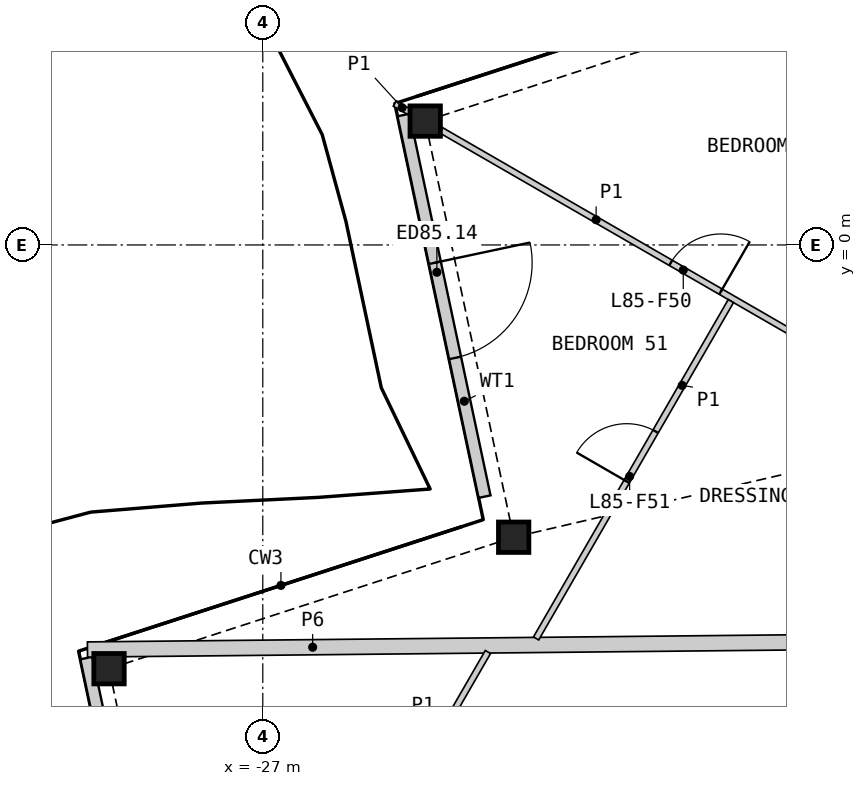
"""IFC4 building model, lengths in metres.
Left out: names, types, materials, properties, quantities, classifications, styles, units other than length and angle.
Written with IfcOpenShell. Run it as: python <this file> out.ifc"""

import sys

from ifc_helpers import new_model, si_unit, direction, frame, frame_2d, origin, origin_2d, place, context, subcontext, project, spatial, rectangle, hollow_rectangle, extrude, element, fill, save


model = new_model("IFC4")
c1 = context("Model", 3, precision=1e-05, world=origin(), true_north=direction((0.0, 1.0)))
c2 = subcontext(c1, "Body", "Model", "MODEL_VIEW")
j1 = project(units=[si_unit("LENGTHUNIT", "METRE"), si_unit("PLANEANGLEUNIT", "RADIAN")], contexts=[c1])
p1 = place(None, origin())
s1 = spatial("IfcSite", under=j1, at=p1, CompositionType="ELEMENT")
p2 = place(p1, origin())
s2 = spatial("IfcBuilding", under=s1, at=p2, CompositionType="ELEMENT")
p3 = place(p2, frame((0.0, 0.0, 378.0)))
s3 = spatial("IfcBuildingStorey", under=s2, at=p3, CompositionType="ELEMENT", Elevation=378.0)
for number, where, z_axis, x_axis in (
    (1, (-24.329, 2.037, 0.0), (0.0, 0.0, 1.0), (1.0, 0.0, 0.0)),
    (2, (-22.874, -4.807, 0.0), (0.0, 0.0, 1.0), (1.0, 0.0, 0.0)),
    (3, (-29.529, -6.969, 0.0), (0.0, 0.0, 1.0), (1.0, 0.0, 0.0)),
):
    element("IfcColumn", number, at=place(p3, frame(where, z_axis=z_axis, x_axis=x_axis)), inside=s3, PredefinedType="COLUMN", context=c2, shape_type="SweptSolid", body=[
        extrude(hollow_rectangle(XDim=0.5, YDim=0.5, WallThickness=0.03, at=origin_2d()), origin(), (0.0, 0.0, 1.0), 3.4),
    ])
p4 = place(p3, frame((-24.687, 2.137, 0.0), z_axis=(0.0, 0.0, 1.0), x_axis=(0.207904718109, -0.978149082803, 0.0)))
e4 = element("IfcWall", 4, at=p4, inside=s3, PredefinedType="SOLIDWALL", context=c2, shape_type="SweptSolid", body=[
    extrude(rectangle(XDim=6.416, YDim=0.2, at=frame_2d((3.208, 0.0))), origin(), (0.0, 0.0, 1.0), 2.634),
])
p5 = place(p4, frame((2.484, 0.0, 0.0)))
e5 = element("IfcOpeningElement", 5, at=p5, cuts=e4, PredefinedType="OPENING", context=c2, shape_type="SweptSolid", body=[
    extrude(rectangle(XDim=1.6, YDim=2.25, at=frame_2d((0.8, 1.125))), frame((0.0, 0.11, 0.0), z_axis=(0.0, -1.0, 0.0), x_axis=(1.0, 0.0, 0.0)), (0.0, 0.0, 1.0), 0.22),
])
p6 = place(p3, frame((-29.903, -6.795, 0.0), z_axis=(0.0, 0.0, 1.0), x_axis=(0.207923959653, -0.978144992832, 0.0)))
e6 = element("IfcWall", 6, at=p6, inside=s3, PredefinedType="SOLIDWALL", context=c2, shape_type="SweptSolid", body=[
    extrude(rectangle(XDim=6.493, YDim=0.2, at=frame_2d((3.247, 0.0))), origin(), (0.0, 0.0, 1.0), 2.634),
])
p7 = place(p6, frame((2.561, 0.0, 0.0)))
e7 = element("IfcOpeningElement", 7, at=p7, cuts=e6, PredefinedType="OPENING", context=c2, shape_type="SweptSolid", body=[
    extrude(rectangle(XDim=1.6, YDim=2.25, at=frame_2d((0.8, 1.125))), frame((0.0, 0.11, 0.0), z_axis=(0.0, -1.0, 0.0), x_axis=(1.0, 0.0, 0.0)), (0.0, 0.0, 1.0), 0.22),
])
p8 = place(p3, frame((-29.883, -6.654, 0.0), z_axis=(0.0, 0.0, 1.0), x_axis=(0.999949143254, 0.010085182526, 0.0)))
e8 = element("IfcWall", 8, at=p8, inside=s3, PredefinedType="PARTITIONING", context=c2, shape_type="SweptSolid", body=[
    extrude(rectangle(XDim=14.815, YDim=0.25, at=frame_2d((7.408, 0.0))), origin(), (0.0, 0.0, 1.0), 2.33),
])
p9 = place(p3, frame((-24.069, 1.887, 0.0), z_axis=(0.0, 0.0, 1.0), x_axis=(0.866023404247, -0.500003463284, 0.0)))
e9 = element("IfcWall", 9, at=p9, inside=s3, PredefinedType="PARTITIONING", context=c2, shape_type="SweptSolid", body=[
    extrude(rectangle(XDim=11.782, YDim=0.1, at=frame_2d((5.891, 0.0))), origin(), (0.0, 0.0, 1.0), 2.33),
])
p10 = place(p9, frame((4.363, 0.0, 0.0)))
e10 = element("IfcOpeningElement", 10, at=p10, cuts=e9, PredefinedType="OPENING", context=c2, shape_type="SweptSolid", body=[
    extrude(rectangle(XDim=0.95, YDim=2.1, at=frame_2d((0.475, 1.05))), frame((0.0, 0.06, 0.0), z_axis=(0.0, -1.0, 0.0), x_axis=(1.0, 0.0, 0.0)), (0.0, 0.0, 1.0), 0.12),
])
p11 = place(p3, frame((-22.505, -6.472, 0.0), z_axis=(0.0, 0.0, 1.0), x_axis=(0.499999516514, 0.866025682925, 0.0)))
e11 = element("IfcWall", 11, at=p11, inside=s3, PredefinedType="PARTITIONING", context=c2, shape_type="SweptSolid", body=[
    extrude(rectangle(XDim=6.407, YDim=0.1, at=frame_2d((3.204, 0.0))), origin(), (0.0, 0.0, 1.0), 2.33),
])
p12 = place(p11, frame((2.981, 0.0, 0.0)))
e12 = element("IfcOpeningElement", 12, at=p12, cuts=e11, PredefinedType="OPENING", context=c2, shape_type="SweptSolid", body=[
    extrude(rectangle(XDim=0.95, YDim=2.1, at=frame_2d((0.475, 1.05))), frame((0.0, 0.06, 0.0), z_axis=(0.0, -1.0, 0.0), x_axis=(1.0, 0.0, 0.0)), (0.0, 0.0, 1.0), 0.12),
])
p13 = place(p3, frame((-24.726, -9.169, 0.0), z_axis=(0.0, 0.0, 1.0), x_axis=(0.499971481985, 0.866041868042, 0.0)))
e13 = element("IfcWall", 13, at=p13, inside=s3, PredefinedType="PARTITIONING", context=c2, shape_type="SweptSolid", body=[
    extrude(rectangle(XDim=2.857, YDim=0.1, at=frame_2d((1.429, 0.0))), origin(), (0.0, 0.0, 1.0), 2.33),
])
p14 = place(p3, frame((-24.829, 2.326, 0.0), z_axis=(0.0, 0.0, 1.0), x_axis=(0.866288059981, -0.499544789918, 0.0)))
e14 = element("IfcWall", 14, at=p14, inside=s3, PredefinedType="PARTITIONING", context=c2, shape_type="SweptSolid", body=[
    extrude(rectangle(XDim=0.278, YDim=0.1, at=frame_2d((0.139, 0.0))), origin(), (0.0, 0.0, 1.0), 2.33),
])
p15 = place(p5, origin())
e15 = element("IfcDoor", 15, at=p15, inside=s3, OperationType="DOUBLE_DOOR_SINGLE_SWING", PredefinedType="DOOR", context=c2, shape_type="SweptSolid", body=[
    extrude(rectangle(XDim=1.6, YDim=2.25, at=frame_2d((0.8, 1.125))), frame((0.0, 0.025, 0.0), z_axis=(0.0, -1.0, 0.0), x_axis=(1.0, 0.0, 0.0)), (0.0, 0.0, 1.0), 0.05),
])
fill(e5, e15)
p16 = place(p10, origin())
e16 = element("IfcDoor", 16, at=p16, inside=s3, OperationType="SINGLE_SWING_RIGHT", PredefinedType="DOOR", context=c2, shape_type="SweptSolid", body=[
    extrude(rectangle(XDim=0.95, YDim=2.1, at=frame_2d((0.475, 1.05))), frame((0.0, 0.025, 0.0), z_axis=(0.0, -1.0, 0.0), x_axis=(1.0, 0.0, 0.0)), (0.0, 0.0, 1.0), 0.05),
])
fill(e10, e16)
p17 = place(p12, origin())
e17 = element("IfcDoor", 17, at=p17, inside=s3, OperationType="SINGLE_SWING_LEFT", PredefinedType="DOOR", context=c2, shape_type="SweptSolid", body=[
    extrude(rectangle(XDim=0.95, YDim=2.1, at=frame_2d((0.475, 1.05))), frame((0.0, 0.025, 0.0), z_axis=(0.0, -1.0, 0.0), x_axis=(1.0, 0.0, 0.0)), (0.0, 0.0, 1.0), 0.05),
])
fill(e12, e17)
save(model, sys.argv[1])
